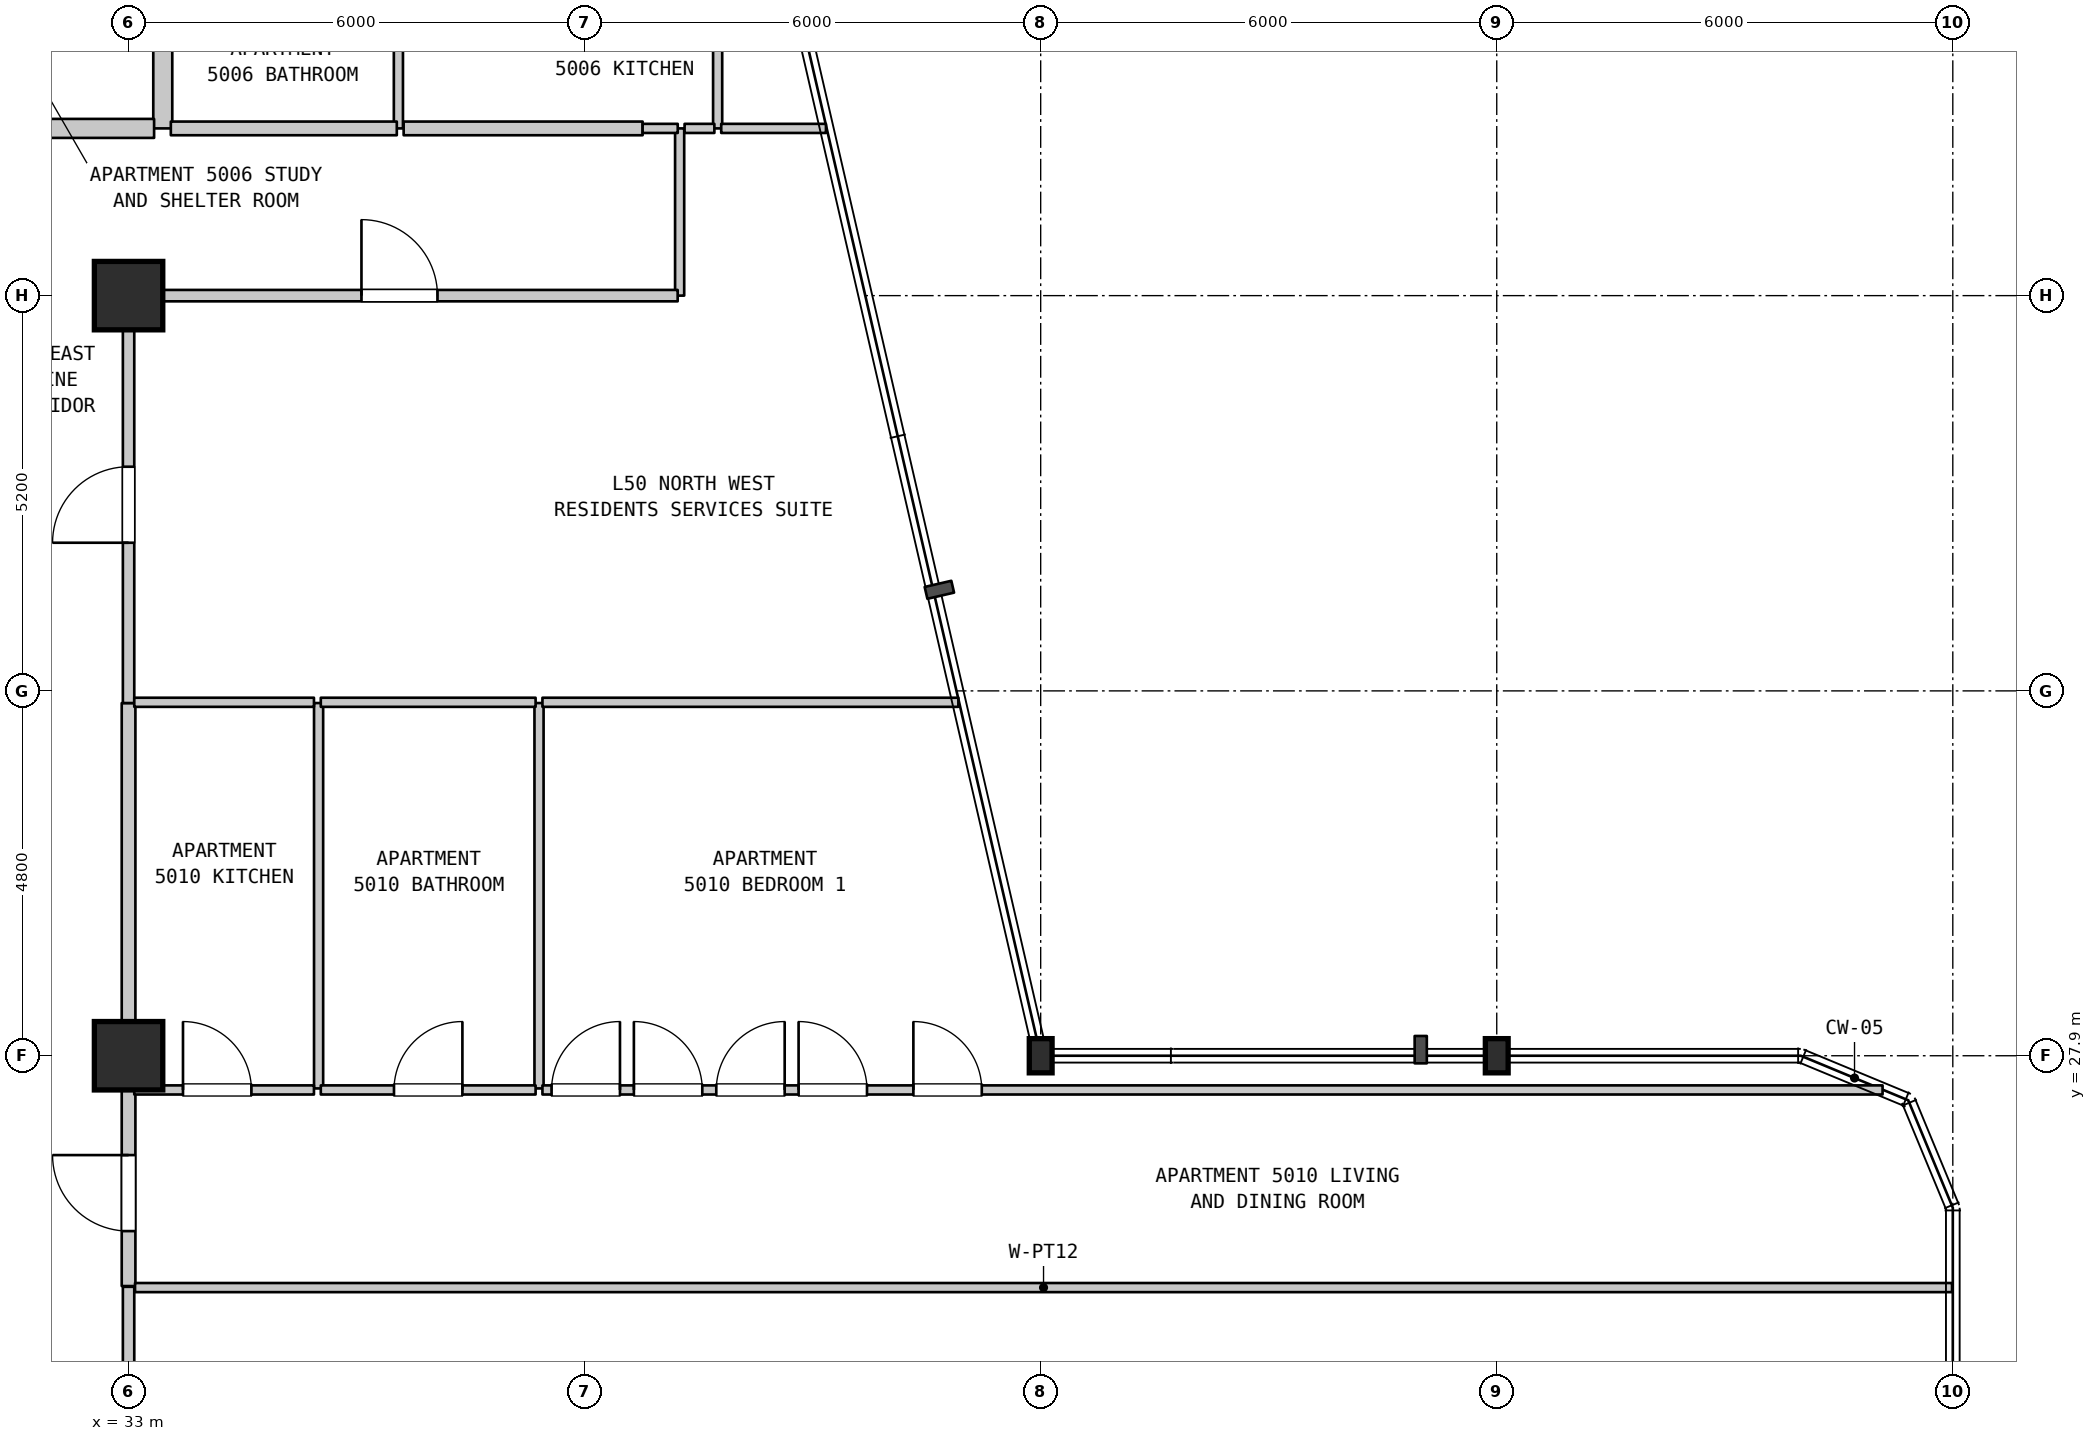
"""IFC4 building model, lengths in metres.
Left out: names, types, materials, properties, quantities, classifications, styles, units other than length and angle.
Written with IfcOpenShell. Run it as: python <this file> out.ifc"""

import sys

from ifc_helpers import new_model, si_unit, direction, frame, frame_2d, origin, origin_2d, place, context, subcontext, project, spatial, rectangle, i_section, extrude, element, fill, save


model = new_model("IFC4")
c1 = context("Model", 3, precision=1e-05, world=origin(), true_north=direction((0.0, 1.0)))
c2 = subcontext(c1, "Body", "Model", "MODEL_VIEW")
j1 = project(units=[si_unit("LENGTHUNIT", "METRE"), si_unit("PLANEANGLEUNIT", "RADIAN")], contexts=[c1])
p1 = place(None, origin())
s1 = spatial("IfcSite", under=j1, at=p1, CompositionType="ELEMENT")
p2 = place(p1, origin())
s2 = spatial("IfcBuilding", under=s1, at=p2, CompositionType="ELEMENT")
p3 = place(p2, frame((0.0, 0.0, 203.2)))
s3 = spatial("IfcBuildingStorey", under=s2, at=p3, CompositionType="ELEMENT", Elevation=203.2)
for number, where, z_axis, x_axis in (
    (1, (33.0, 27.9, 0.0), (0.0, 0.0, 1.0), (1.0, 0.0, 0.0)),
    (2, (33.0, 37.9, 0.0), (0.0, 0.0, 1.0), (1.0, 0.0, 0.0)),
):
    element("IfcColumn", number, at=place(p3, frame(where, z_axis=z_axis, x_axis=x_axis)), inside=s3, PredefinedType="COLUMN", context=c2, shape_type="SweptSolid", body=[
        extrude(rectangle(XDim=0.9, YDim=0.9, at=origin_2d()), origin(), (0.0, 0.0, 1.0), 3.7),
    ])
for number, where, z_axis, x_axis in (
    (3, (45.0, 27.9, 0.0), (0.0, 0.0, 1.0), (1.0, 0.0, 0.0)),
    (4, (51.0, 27.9, 0.0), (0.0, 0.0, 1.0), (1.0, 0.0, 0.0)),
):
    element("IfcColumn", number, at=place(p3, frame(where, z_axis=z_axis, x_axis=x_axis)), inside=s3, PredefinedType="COLUMN", context=c2, shape_type="SweptSolid", body=[
        extrude(i_section(OverallWidth=0.3, OverallDepth=0.45, WebThickness=0.014, FlangeThickness=0.026, FilletRadius=0.027, at=origin_2d()), origin(), (0.0, 0.0, 1.0), 3.7),
    ])
p4 = place(p3, frame((33.0, 19.51, 0.0), z_axis=(0.0, 0.0, 1.0), x_axis=(0.0, 1.0, 0.0)))
e5 = element("IfcWall", 5, at=p4, inside=s3, PredefinedType="STANDARD", context=c2, shape_type="SweptSolid", body=[
    extrude(rectangle(XDim=5.35, YDim=0.15, at=frame_2d((2.675, 0.0))), origin(), (0.0, 0.0, 1.0), 2.99),
])
p5 = place(p4, frame((1.534, 0.0, 0.0)))
e6 = element("IfcOpeningElement", 6, at=p5, cuts=e5, PredefinedType="OPENING", context=c2, shape_type="SweptSolid", body=[
    extrude(rectangle(XDim=1.0, YDim=2.15, at=frame_2d((0.5, 1.075))), frame((0.0, 0.085, 0.0), z_axis=(0.0, -1.0, 0.0), x_axis=(1.0, 0.0, 0.0)), (0.0, 0.0, 1.0), 0.17),
])
p6 = place(p3, frame((33.0, 24.87, 0.0), z_axis=(0.0, 0.0, 1.0), x_axis=(0.0, 1.0, 0.0)))
e7 = element("IfcWall", 7, at=p6, inside=s3, PredefinedType="STANDARD", context=c2, shape_type="SweptSolid", body=[
    extrude(rectangle(XDim=2.6, YDim=0.18, at=frame_2d((1.3, 0.0))), origin(), (0.0, 0.0, 1.0), 2.99),
])
p7 = place(p6, frame((0.723, 0.0, 0.0)))
e8 = element("IfcOpeningElement", 8, at=p7, cuts=e7, PredefinedType="OPENING", context=c2, shape_type="SweptSolid", body=[
    extrude(rectangle(XDim=1.0, YDim=2.15, at=frame_2d((0.5, 1.075))), frame((0.0, 0.1, 0.0), z_axis=(0.0, -1.0, 0.0), x_axis=(1.0, 0.0, 0.0)), (0.0, 0.0, 1.0), 0.2),
])
p8 = place(p3, frame((33.0, 27.47, 0.0), z_axis=(0.0, 0.0, 1.0), x_axis=(0.0, 1.0, 0.0)))
e9 = element("IfcWall", 9, at=p8, inside=s3, PredefinedType="STANDARD", context=c2, shape_type="SweptSolid", body=[
    extrude(rectangle(XDim=5.07, YDim=0.18, at=frame_2d((2.535, 0.0))), origin(), (0.0, 0.0, 1.0), 2.89),
])
p9 = place(p3, frame((33.0, 32.54, 0.0), z_axis=(0.0, 0.0, 1.0), x_axis=(0.0, 1.0, 0.0)))
e10 = element("IfcWall", 10, at=p9, inside=s3, PredefinedType="STANDARD", context=c2, shape_type="SweptSolid", body=[
    extrude(rectangle(XDim=5.36, YDim=0.15, at=frame_2d((2.68, 0.0))), origin(), (0.0, 0.0, 1.0), 2.89),
])
p10 = place(p9, frame((2.109, 0.0, 0.0)))
e11 = element("IfcOpeningElement", 11, at=p10, cuts=e10, PredefinedType="OPENING", context=c2, shape_type="SweptSolid", body=[
    extrude(rectangle(XDim=1.0, YDim=2.15, at=frame_2d((0.5, 1.075))), frame((0.0, 0.085, 0.0), z_axis=(0.0, -1.0, 0.0), x_axis=(1.0, 0.0, 0.0)), (0.0, 0.0, 1.0), 0.17),
])
p11 = place(p3, frame((33.45, 40.1, 0.0), z_axis=(0.0, 0.0, 1.0), x_axis=(0.0, 1.0, 0.0)))
e12 = element("IfcWall", 12, at=p11, inside=s3, PredefinedType="STANDARD", context=c2, shape_type="SweptSolid", body=[
    extrude(rectangle(XDim=2.3, YDim=0.25, at=frame_2d((1.15, 0.0))), origin(), (0.0, 0.0, 1.0), 3.39),
])
p12 = place(p3, frame((35.5, 27.47, 0.0), z_axis=(0.0, 0.0, 1.0), x_axis=(0.0, 1.0, 0.0)))
e13 = element("IfcWall", 13, at=p12, inside=s3, PredefinedType="PARTITIONING", context=c2, shape_type="SweptSolid", body=[
    extrude(rectangle(XDim=5.07, YDim=0.12, at=frame_2d((2.535, 0.0))), origin(), (0.0, 0.0, 1.0), 3.39),
])
p13 = place(p3, frame((36.55, 40.1, 0.0), z_axis=(0.0, 0.0, 1.0), x_axis=(0.0, 1.0, 0.0)))
e14 = element("IfcWall", 14, at=p13, inside=s3, PredefinedType="PARTITIONING", context=c2, shape_type="SweptSolid", body=[
    extrude(rectangle(XDim=2.3, YDim=0.12, at=frame_2d((1.15, 0.0))), origin(), (0.0, 0.0, 1.0), 3.39),
])
p14 = place(p3, frame((38.4, 27.47, 0.0), z_axis=(0.0, 0.0, 1.0), x_axis=(0.0, 1.0, 0.0)))
e15 = element("IfcWall", 15, at=p14, inside=s3, PredefinedType="PARTITIONING", context=c2, shape_type="SweptSolid", body=[
    extrude(rectangle(XDim=5.07, YDim=0.12, at=frame_2d((2.535, 0.0))), origin(), (0.0, 0.0, 1.0), 3.39),
])
p15 = place(p3, frame((40.25, 37.9, 0.0), z_axis=(0.0, 0.0, 1.0), x_axis=(0.0, 1.0, 0.0)))
e16 = element("IfcWall", 16, at=p15, inside=s3, PredefinedType="PARTITIONING", context=c2, shape_type="SweptSolid", body=[
    extrude(rectangle(XDim=2.2, YDim=0.12, at=frame_2d((1.1, 0.0))), origin(), (0.0, 0.0, 1.0), 3.39),
])
p16 = place(p3, frame((40.75, 40.1, 0.0), z_axis=(0.0, 0.0, 1.0), x_axis=(0.0, 1.0, 0.0)))
e17 = element("IfcWall", 17, at=p16, inside=s3, PredefinedType="PARTITIONING", context=c2, shape_type="SweptSolid", body=[
    extrude(rectangle(XDim=2.3, YDim=0.12, at=frame_2d((1.15, 0.0))), origin(), (0.0, 0.0, 1.0), 3.39),
])
p17 = place(p3, frame((33.085, 24.85, 0.0), z_axis=(0.0, 0.0, 1.0), x_axis=(1.0, 0.0, 0.0)))
e18 = element("IfcWall", 18, at=p17, inside=s3, PredefinedType="PARTITIONING", context=c2, shape_type="SweptSolid", body=[
    extrude(rectangle(XDim=23.905, YDim=0.12, at=frame_2d((11.953, 0.0))), origin(), (0.0, 0.0, 1.0), 3.39),
])
p18 = place(p3, frame((33.075, 27.45, 0.0), z_axis=(0.0, 0.0, 1.0), x_axis=(1.0, 0.0, 0.0)))
e19 = element("IfcWall", 19, at=p18, inside=s3, PredefinedType="PARTITIONING", context=c2, shape_type="SweptSolid", body=[
    extrude(rectangle(XDim=2.364, YDim=0.12, at=frame_2d((1.182, 0.0))), origin(), (0.0, 0.0, 1.0), 3.39),
])
p19 = place(p18, frame((0.641, 0.0, 0.0)))
e20 = element("IfcOpeningElement", 20, at=p19, cuts=e19, PredefinedType="OPENING", context=c2, shape_type="SweptSolid", body=[
    extrude(rectangle(XDim=0.9, YDim=2.15, at=frame_2d((0.45, 1.075))), frame((0.0, 0.07, 0.0), z_axis=(0.0, -1.0, 0.0), x_axis=(1.0, 0.0, 0.0)), (0.0, 0.0, 1.0), 0.14),
])
p20 = place(p3, frame((35.529, 27.45, 0.0), z_axis=(0.0, 0.0, 1.0), x_axis=(1.0, 0.0, 0.0)))
e21 = element("IfcWall", 21, at=p20, inside=s3, PredefinedType="PARTITIONING", context=c2, shape_type="SweptSolid", body=[
    extrude(rectangle(XDim=2.826, YDim=0.12, at=frame_2d((1.413, 0.0))), origin(), (0.0, 0.0, 1.0), 3.39),
])
p21 = place(p20, frame((0.963, 0.0, 0.0)))
e22 = element("IfcOpeningElement", 22, at=p21, cuts=e21, PredefinedType="OPENING", context=c2, shape_type="SweptSolid", body=[
    extrude(rectangle(XDim=0.9, YDim=2.1, at=frame_2d((0.45, 1.05))), frame((0.0, 0.07, 0.0), z_axis=(0.0, -1.0, 0.0), x_axis=(1.0, 0.0, 0.0)), (0.0, 0.0, 1.0), 0.14),
])
p22 = place(p3, frame((38.445, 27.45, 0.0), z_axis=(0.0, 0.0, 1.0), x_axis=(1.0, 0.0, 0.0)))
e23 = element("IfcWall", 23, at=p22, inside=s3, PredefinedType="PARTITIONING", context=c2, shape_type="SweptSolid", body=[
    extrude(rectangle(XDim=17.631, YDim=0.12, at=frame_2d((8.815, 0.0))), origin(), (0.0, 0.0, 1.0), 3.39),
])
p23 = place(p22, frame((4.88, 0.0, 0.0)))
e24 = element("IfcOpeningElement", 24, at=p23, cuts=e23, PredefinedType="OPENING", context=c2, shape_type="SweptSolid", body=[
    extrude(rectangle(XDim=0.9, YDim=2.15, at=frame_2d((0.45, 1.075))), frame((0.0, 0.07, 0.0), z_axis=(0.0, -1.0, 0.0), x_axis=(1.0, 0.0, 0.0)), (0.0, 0.0, 1.0), 0.14),
])
p24 = place(p22, frame((0.12, 0.0, 0.0)))
e25 = element("IfcOpeningElement", 25, at=p24, cuts=e23, PredefinedType="OPENING", context=c2, shape_type="SweptSolid", body=[
    extrude(rectangle(XDim=0.9, YDim=2.15, at=frame_2d((0.45, 1.075))), frame((0.0, 0.07, 0.0), z_axis=(0.0, -1.0, 0.0), x_axis=(1.0, 0.0, 0.0)), (0.0, 0.0, 1.0), 0.14),
])
p25 = place(p22, frame((1.203, 0.0, 0.0)))
e26 = element("IfcOpeningElement", 26, at=p25, cuts=e23, PredefinedType="OPENING", context=c2, shape_type="SweptSolid", body=[
    extrude(rectangle(XDim=0.9, YDim=2.15, at=frame_2d((0.45, 1.075))), frame((0.0, 0.07, 0.0), z_axis=(0.0, -1.0, 0.0), x_axis=(1.0, 0.0, 0.0)), (0.0, 0.0, 1.0), 0.14),
])
p26 = place(p22, frame((2.287, 0.0, 0.0)))
e27 = element("IfcOpeningElement", 27, at=p26, cuts=e23, PredefinedType="OPENING", context=c2, shape_type="SweptSolid", body=[
    extrude(rectangle(XDim=0.9, YDim=2.15, at=frame_2d((0.45, 1.075))), frame((0.0, 0.07, 0.0), z_axis=(0.0, -1.0, 0.0), x_axis=(1.0, 0.0, 0.0)), (0.0, 0.0, 1.0), 0.14),
])
p27 = place(p22, frame((3.37, 0.0, 0.0)))
e28 = element("IfcOpeningElement", 28, at=p27, cuts=e23, PredefinedType="OPENING", context=c2, shape_type="SweptSolid", body=[
    extrude(rectangle(XDim=0.9, YDim=2.15, at=frame_2d((0.45, 1.075))), frame((0.0, 0.07, 0.0), z_axis=(0.0, -1.0, 0.0), x_axis=(1.0, 0.0, 0.0)), (0.0, 0.0, 1.0), 0.14),
])
p28 = place(p3, frame((33.075, 32.55, 0.0), z_axis=(0.0, 0.0, 1.0), x_axis=(1.0, 0.0, 0.0)))
e29 = element("IfcWall", 29, at=p28, inside=s3, PredefinedType="PARTITIONING", context=c2, shape_type="SweptSolid", body=[
    extrude(rectangle(XDim=2.364, YDim=0.12, at=frame_2d((1.182, 0.0))), origin(), (0.0, 0.0, 1.0), 3.39),
])
p29 = place(p3, frame((35.529, 32.55, 0.0), z_axis=(0.0, 0.0, 1.0), x_axis=(1.0, 0.0, 0.0)))
e30 = element("IfcWall", 30, at=p29, inside=s3, PredefinedType="PARTITIONING", context=c2, shape_type="SweptSolid", body=[
    extrude(rectangle(XDim=2.826, YDim=0.12, at=frame_2d((1.413, 0.0))), origin(), (0.0, 0.0, 1.0), 3.39),
])
p30 = place(p3, frame((38.445, 32.55, 0.0), z_axis=(0.0, 0.0, 1.0), x_axis=(1.0, 0.0, 0.0)))
e31 = element("IfcWall", 31, at=p30, inside=s3, PredefinedType="PARTITIONING", context=c2, shape_type="SweptSolid", body=[
    extrude(rectangle(XDim=5.472, YDim=0.12, at=frame_2d((2.736, 0.0))), origin(), (0.0, 0.0, 1.0), 3.39),
])
p31 = place(p3, frame((33.06, 37.9, 0.0), z_axis=(0.0, 0.0, 1.0), x_axis=(1.0, 0.0, 0.0)))
e32 = element("IfcWall", 32, at=p31, inside=s3, PredefinedType="STANDARD", context=c2, shape_type="SweptSolid", body=[
    extrude(rectangle(XDim=7.164, YDim=0.15, at=frame_2d((3.582, 0.0))), origin(), (0.0, 0.0, 1.0), 3.39),
])
p32 = place(p31, frame((3.004, 0.0, 0.0)))
e33 = element("IfcOpeningElement", 33, at=p32, cuts=e32, PredefinedType="OPENING", context=c2, shape_type="SweptSolid", body=[
    extrude(rectangle(XDim=1.0, YDim=2.15, at=frame_2d((0.5, 1.075))), frame((0.0, 0.085, 0.0), z_axis=(0.0, -1.0, 0.0), x_axis=(1.0, 0.0, 0.0)), (0.0, 0.0, 1.0), 0.17),
])
p33 = place(p3, frame((29.69, 40.1, 0.0), z_axis=(0.0, 0.0, 1.0), x_axis=(1.0, 0.0, 0.0)))
e34 = element("IfcWall", 34, at=p33, inside=s3, PredefinedType="STANDARD", context=c2, shape_type="SweptSolid", body=[
    extrude(rectangle(XDim=3.646, YDim=0.25, at=frame_2d((1.823, 0.0))), origin(), (0.0, 0.0, 1.0), 3.39),
])
p34 = place(p3, frame((33.556, 40.1, 0.0), z_axis=(0.0, 0.0, 1.0), x_axis=(1.0, 0.0, 0.0)))
e35 = element("IfcWall", 35, at=p34, inside=s3, PredefinedType="STANDARD", context=c2, shape_type="SweptSolid", body=[
    extrude(rectangle(XDim=2.973, YDim=0.18, at=frame_2d((1.487, 0.0))), origin(), (0.0, 0.0, 1.0), 3.39),
])
p35 = place(p3, frame((36.619, 40.1, 0.0), z_axis=(0.0, 0.0, 1.0), x_axis=(1.0, 0.0, 0.0)))
e36 = element("IfcWall", 36, at=p35, inside=s3, PredefinedType="STANDARD", context=c2, shape_type="SweptSolid", body=[
    extrude(rectangle(XDim=3.144, YDim=0.18, at=frame_2d((1.572, 0.0))), origin(), (0.0, 0.0, 1.0), 3.39),
])
p36 = place(p3, frame((39.763, 40.1, 0.0), z_axis=(0.0, 0.0, 1.0), x_axis=(1.0, 0.0, 0.0)))
e37 = element("IfcWall", 37, at=p36, inside=s3, PredefinedType="PARTITIONING", context=c2, shape_type="SweptSolid", body=[
    extrude(rectangle(XDim=0.462, YDim=0.12, at=frame_2d((0.231, 0.0))), origin(), (0.0, 0.0, 1.0), 3.39),
])
p37 = place(p3, frame((40.315, 40.1, 0.0), z_axis=(0.0, 0.0, 1.0), x_axis=(1.0, 0.0, 0.0)))
e38 = element("IfcWall", 38, at=p37, inside=s3, PredefinedType="PARTITIONING", context=c2, shape_type="SweptSolid", body=[
    extrude(rectangle(XDim=0.392, YDim=0.12, at=frame_2d((0.196, 0.0))), origin(), (0.0, 0.0, 1.0), 3.39),
])
p38 = place(p3, frame((40.797, 40.1, 0.0), z_axis=(0.0, 0.0, 1.0), x_axis=(1.0, 0.0, 0.0)))
e39 = element("IfcWall", 39, at=p38, inside=s3, PredefinedType="PARTITIONING", context=c2, shape_type="SweptSolid", body=[
    extrude(rectangle(XDim=1.378, YDim=0.12, at=frame_2d((0.689, 0.0))), origin(), (0.0, 0.0, 1.0), 3.39),
])
p39 = place(p7, origin())
e40 = element("IfcDoor", 40, at=p39, inside=s3, OperationType="SINGLE_SWING_RIGHT", PredefinedType="DOOR", context=c2, shape_type="SweptSolid", body=[
    extrude(rectangle(XDim=1.0, YDim=2.15, at=frame_2d((0.5, 1.075))), frame((0.0, 0.025, 0.0), z_axis=(0.0, -1.0, 0.0), x_axis=(1.0, 0.0, 0.0)), (0.0, 0.0, 1.0), 0.05),
])
fill(e8, e40)
p40 = place(p10, origin())
e41 = element("IfcDoor", 41, at=p40, inside=s3, OperationType="SINGLE_SWING_LEFT", PredefinedType="DOOR", context=c2, shape_type="SweptSolid", body=[
    extrude(rectangle(XDim=1.0, YDim=2.15, at=frame_2d((0.5, 1.075))), frame((0.0, 0.025, 0.0), z_axis=(0.0, -1.0, 0.0), x_axis=(1.0, 0.0, 0.0)), (0.0, 0.0, 1.0), 0.05),
])
fill(e11, e41)
p41 = place(p19, origin())
e42 = element("IfcDoor", 42, at=p41, inside=s3, OperationType="SINGLE_SWING_LEFT", PredefinedType="DOOR", context=c2, shape_type="SweptSolid", body=[
    extrude(rectangle(XDim=0.9, YDim=2.15, at=frame_2d((0.45, 1.075))), frame((0.0, 0.025, 0.0), z_axis=(0.0, -1.0, 0.0), x_axis=(1.0, 0.0, 0.0)), (0.0, 0.0, 1.0), 0.05),
])
fill(e20, e42)
p42 = place(p21, origin())
e43 = element("IfcDoor", 43, at=p42, inside=s3, OperationType="SINGLE_SWING_RIGHT", PredefinedType="DOOR", context=c2, shape_type="SweptSolid", body=[
    extrude(rectangle(XDim=0.9, YDim=2.1, at=frame_2d((0.45, 1.05))), frame((0.0, 0.025, 0.0), z_axis=(0.0, -1.0, 0.0), x_axis=(1.0, 0.0, 0.0)), (0.0, 0.0, 1.0), 0.05),
])
fill(e22, e43)
p43 = place(p23, origin())
e44 = element("IfcDoor", 44, at=p43, inside=s3, OperationType="SINGLE_SWING_LEFT", PredefinedType="DOOR", context=c2, shape_type="SweptSolid", body=[
    extrude(rectangle(XDim=0.9, YDim=2.15, at=frame_2d((0.45, 1.075))), frame((0.0, 0.025, 0.0), z_axis=(0.0, -1.0, 0.0), x_axis=(1.0, 0.0, 0.0)), (0.0, 0.0, 1.0), 0.05),
])
fill(e24, e44)
p44 = place(p24, origin())
e45 = element("IfcDoor", 45, at=p44, inside=s3, OperationType="SINGLE_SWING_RIGHT", PredefinedType="DOOR", context=c2, shape_type="SweptSolid", body=[
    extrude(rectangle(XDim=0.9, YDim=2.15, at=frame_2d((0.45, 1.075))), frame((0.0, 0.025, 0.0), z_axis=(0.0, -1.0, 0.0), x_axis=(1.0, 0.0, 0.0)), (0.0, 0.0, 1.0), 0.05),
])
fill(e25, e45)
p45 = place(p25, origin())
e46 = element("IfcDoor", 46, at=p45, inside=s3, OperationType="SINGLE_SWING_LEFT", PredefinedType="DOOR", context=c2, shape_type="SweptSolid", body=[
    extrude(rectangle(XDim=0.9, YDim=2.15, at=frame_2d((0.45, 1.075))), frame((0.0, 0.025, 0.0), z_axis=(0.0, -1.0, 0.0), x_axis=(1.0, 0.0, 0.0)), (0.0, 0.0, 1.0), 0.05),
])
fill(e26, e46)
p46 = place(p26, origin())
e47 = element("IfcDoor", 47, at=p46, inside=s3, OperationType="SINGLE_SWING_RIGHT", PredefinedType="DOOR", context=c2, shape_type="SweptSolid", body=[
    extrude(rectangle(XDim=0.9, YDim=2.15, at=frame_2d((0.45, 1.075))), frame((0.0, 0.025, 0.0), z_axis=(0.0, -1.0, 0.0), x_axis=(1.0, 0.0, 0.0)), (0.0, 0.0, 1.0), 0.05),
])
fill(e27, e47)
p47 = place(p27, origin())
e48 = element("IfcDoor", 48, at=p47, inside=s3, OperationType="SINGLE_SWING_LEFT", PredefinedType="DOOR", context=c2, shape_type="SweptSolid", body=[
    extrude(rectangle(XDim=0.9, YDim=2.15, at=frame_2d((0.45, 1.075))), frame((0.0, 0.025, 0.0), z_axis=(0.0, -1.0, 0.0), x_axis=(1.0, 0.0, 0.0)), (0.0, 0.0, 1.0), 0.05),
])
fill(e28, e48)
p48 = place(p32, origin())
e49 = element("IfcDoor", 49, at=p48, inside=s3, OperationType="SINGLE_SWING_LEFT", PredefinedType="DOOR", context=c2, shape_type="SweptSolid", body=[
    extrude(rectangle(XDim=1.0, YDim=2.15, at=frame_2d((0.5, 1.075))), frame((0.0, 0.025, 0.0), z_axis=(0.0, -1.0, 0.0), x_axis=(1.0, 0.0, 0.0)), (0.0, 0.0, 1.0), 0.05),
])
fill(e33, e49)
save(model, sys.argv[1])
